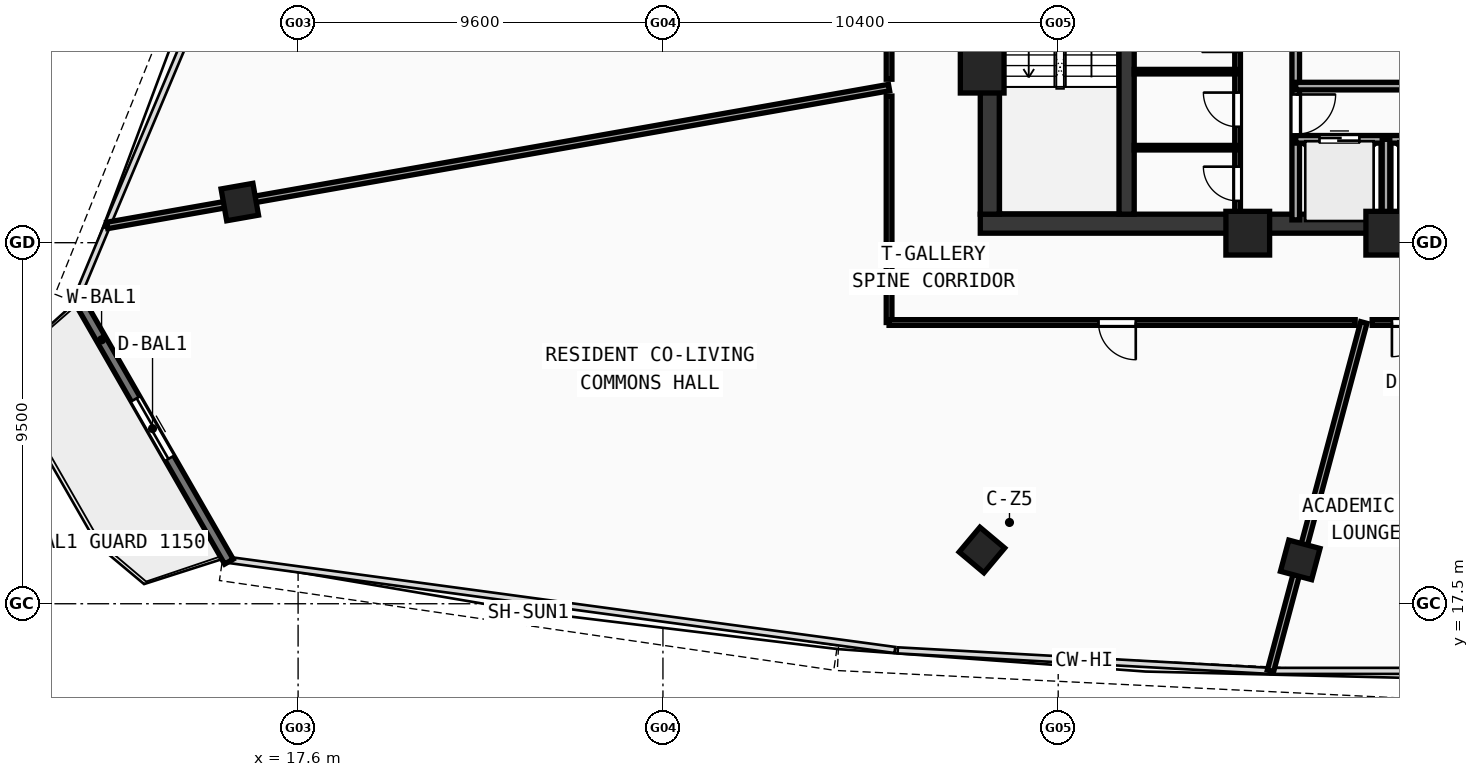
"""IFC4 building model, lengths in metres.
Left out: names, types, materials, properties, quantities, classifications, styles, units other than length and angle.
Written with IfcOpenShell. Run it as: python <this file> out.ifc"""

import sys

from ifc_helpers import new_model, si_unit, direction, frame, frame_2d, origin, origin_with_axes, origin_2d, place, context, subcontext, project, spatial, rectangle, hollow_rectangle, extrude, source, transform, mapped, element, fill, save


model = new_model("IFC4")
c1 = context("Model", 3, precision=1e-05, world=origin(), true_north=direction((0.0, 1.0)))
c2 = subcontext(c1, "Body", "Model", "MODEL_VIEW")
j1 = project(units=[si_unit("LENGTHUNIT", "METRE"), si_unit("PLANEANGLEUNIT", "RADIAN")], contexts=[c1])
p1 = place(None, origin())
s1 = spatial("IfcSite", under=j1, at=p1, CompositionType="ELEMENT")
p2 = place(p1, origin())
s2 = spatial("IfcBuilding", under=s1, at=p2, CompositionType="ELEMENT")
p3 = place(p2, frame((0.0, 0.0, 229.61)))
s3 = spatial("IfcBuildingStorey", under=s2, at=p3, CompositionType="ELEMENT", Elevation=229.61)
p4 = place(p3, frame((35.55, 27.5, 0.0), z_axis=(0.0, 0.0, 1.0), x_axis=(1.0, 0.0, 0.0)))
e1 = element("IfcWall", 1, at=p4, inside=s3, PredefinedType="SHEAR", context=c2, shape_type="SweptSolid", body=[
    extrude(rectangle(XDim=24.9, YDim=0.5, at=frame_2d((12.45, 0.0))), origin(), (0.0, 0.0, 1.0), 3.47),
])
p5 = place(p3, frame((35.8, 27.75, 0.0), z_axis=(0.0, 0.0, 1.0), x_axis=(0.0, 1.0, 0.0)))
e2 = element("IfcWall", 2, at=p5, inside=s3, PredefinedType="SHEAR", context=c2, shape_type="SweptSolid", body=[
    extrude(rectangle(XDim=12.2, YDim=0.5, at=frame_2d((6.1, 0.0))), origin(), (0.0, 0.0, 1.0), 3.47),
])
p6 = place(p3, frame((39.4, 27.75, 0.0), z_axis=(0.0, 0.0, 1.0), x_axis=(0.0, 1.0, 0.0)))
e3 = element("IfcWall", 3, at=p6, inside=s3, PredefinedType="SHEAR", context=c2, shape_type="SweptSolid", body=[
    extrude(rectangle(XDim=12.2, YDim=0.4, at=frame_2d((6.1, 0.0))), origin(), (0.0, 0.0, 1.0), 3.47),
])
p7 = place(p6, frame((10.0, 0.0, 0.0)))
e4 = element("IfcOpeningElement", 4, at=p7, cuts=e3, PredefinedType="OPENING", context=c2, shape_type="SweptSolid", body=[
    extrude(rectangle(XDim=1.1, YDim=2.1, at=frame_2d((0.55, 1.05))), frame((0.0, 0.21, 0.0), z_axis=(0.0, -1.0, 0.0), x_axis=(1.0, 0.0, 0.0)), (0.0, 0.0, 1.0), 0.42),
])
m1 = source(origin(), c2, "Body", "SweptSolid", [
    extrude(hollow_rectangle(XDim=1.15, YDim=1.15, WallThickness=0.048, at=origin_2d()), origin(), (0.0, 0.0, 1.0), 3.73),
])
for number, where, z_axis, x_axis in (
    (5, (42.588, 27.25, -0.26), (0.0, 0.0, 1.0), (1.0, 0.0, 0.0)),
    (6, (46.272, 27.25, -0.26), (0.0, 0.0, 1.0), (1.0, 0.0, 0.0)),
    (7, (35.6, 31.513, -0.26), (0.0, 0.0, 1.0), (1.0, 0.0, 0.0)),
):
    element("IfcColumn", number, at=place(p3, frame(where, z_axis=z_axis, x_axis=x_axis)), inside=s3, PredefinedType="COLUMN", context=c2, shape_type="MappedRepresentation", body=[
        mapped(m1, transform((0.0, 0.0, 0.0), scale=1.0)),
    ])
m2 = source(origin(), c2, "Body", "SweptSolid", [
    extrude(hollow_rectangle(XDim=0.85, YDim=0.85, WallThickness=0.034, at=origin_2d()), origin(), (0.0, 0.0, 1.0), 3.73),
])
for number, where, z_axis, x_axis in (
    (8, (35.593, 18.914, -0.26), (0.0, 0.0, 1.0), (0.766, -0.643, 0.0)),
    (9, (43.969, 18.654, -0.26), (0.0, 0.0, 1.0), (0.966, -0.259, 0.0)),
    (10, (16.066, 28.069, -0.26), (0.0, 0.0, 1.0), (0.174, -0.985, 0.0)),
):
    element("IfcColumn", number, at=place(p3, frame(where, z_axis=z_axis, x_axis=x_axis)), inside=s3, PredefinedType="COLUMN", context=c2, shape_type="MappedRepresentation", body=[
        mapped(m2, transform((0.0, 0.0, 0.0), scale=1.0)),
    ])
p8 = place(p3, frame((11.76, 25.609, 0.0), z_axis=(0.0, 0.0, 1.0), x_axis=(0.49791595327, -0.867225289921, 0.0)))
e11 = element("IfcWall", 11, at=p8, inside=s3, PredefinedType="STANDARD", context=c2, shape_type="SweptSolid", body=[
    extrude(rectangle(XDim=8.074, YDim=0.26, at=frame_2d((4.037, 0.0))), origin(), (0.0, 0.0, 1.0), 3.47),
])
p9 = place(p8, frame((3.137, 0.0, 0.0)))
e12 = element("IfcOpeningElement", 12, at=p9, cuts=e11, PredefinedType="OPENING", context=c2, shape_type="SweptSolid", body=[
    extrude(rectangle(XDim=1.8, YDim=2.15, at=frame_2d((0.9, 1.075))), frame((0.0, 0.14, 0.0), z_axis=(0.0, -1.0, 0.0), x_axis=(1.0, 0.0, 0.0)), (0.0, 0.0, 1.0), 0.28),
])
p10 = place(p3, frame((43.85, 27.6, 0.0), z_axis=(0.0, 0.0, 1.0), x_axis=(0.0, 1.0, 0.0)))
e13 = element("IfcWall", 13, at=p10, inside=s3, PredefinedType="SOLIDWALL", context=c2, shape_type="SweptSolid", body=[
    extrude(rectangle(XDim=6.22, YDim=0.2, at=frame_2d((3.11, 0.0))), origin(), (0.0, 0.0, 1.0), 3.47),
])
p11 = place(p10, frame((2.25, 0.0, 0.0)))
e14 = element("IfcOpeningElement", 14, at=p11, cuts=e13, PredefinedType="OPENING", context=c2, shape_type="SweptSolid", body=[
    extrude(rectangle(XDim=1.05, YDim=2.1, at=frame_2d((0.525, 1.05))), frame((0.0, 0.11, 0.0), z_axis=(0.0, -1.0, 0.0), x_axis=(1.0, 0.0, 0.0)), (0.0, 0.0, 1.0), 0.22),
])
p12 = place(p3, frame((43.85, 29.72, 0.0), z_axis=(0.0, 0.0, 1.0), x_axis=(1.0, 0.0, 0.0)))
e15 = element("IfcWall", 15, at=p12, inside=s3, PredefinedType="SOLIDWALL", context=c2, shape_type="SweptSolid", body=[
    extrude(rectangle(XDim=7.2, YDim=0.2, at=frame_2d((3.6, 0.0))), origin(), (0.0, 0.0, 1.0), 3.47),
])
p13 = place(p12, frame((0.625, 0.0, 0.0)))
e16 = element("IfcOpeningElement", 16, at=p13, cuts=e15, PredefinedType="OPENING", context=c2, shape_type="SweptSolid", body=[
    extrude(rectangle(XDim=1.05, YDim=2.1, at=frame_2d((0.525, 1.05))), frame((0.0, 0.11, 0.0), z_axis=(0.0, -1.0, 0.0), x_axis=(1.0, 0.0, 0.0)), (0.0, 0.0, 1.0), 0.22),
])
p14 = place(p12, frame((3.075, 0.0, 0.0)))
e17 = element("IfcOpeningElement", 17, at=p14, cuts=e15, PredefinedType="OPENING", context=c2, shape_type="SweptSolid", body=[
    extrude(rectangle(XDim=1.05, YDim=2.1, at=frame_2d((0.525, 1.05))), frame((0.0, 0.11, 0.0), z_axis=(0.0, -1.0, 0.0), x_axis=(1.0, 0.0, 0.0)), (0.0, 0.0, 1.0), 0.22),
])
p15 = place(p12, frame((5.525, 0.0, 0.0)))
e18 = element("IfcOpeningElement", 18, at=p15, cuts=e15, PredefinedType="OPENING", context=c2, shape_type="SweptSolid", body=[
    extrude(rectangle(XDim=1.05, YDim=2.1, at=frame_2d((0.525, 1.05))), frame((0.0, 0.11, 0.0), z_axis=(0.0, -1.0, 0.0), x_axis=(1.0, 0.0, 0.0)), (0.0, 0.0, 1.0), 0.22),
])
p16 = place(p3, frame((43.85, 31.12, 0.0), z_axis=(0.0, 0.0, 1.0), x_axis=(1.0, 0.0, 0.0)))
e19 = element("IfcWall", 19, at=p16, inside=s3, PredefinedType="SOLIDWALL", context=c2, shape_type="SweptSolid", body=[
    extrude(rectangle(XDim=9.83, YDim=0.2, at=frame_2d((4.915, 0.0))), origin(), (0.0, 0.0, 1.0), 3.47),
])
p17 = place(p3, frame((46.225, 27.6, 0.0), z_axis=(0.0, 0.0, 1.0), x_axis=(0.0, 1.0, 0.0)))
e20 = element("IfcWall", 20, at=p17, inside=s3, PredefinedType="SOLIDWALL", context=c2, shape_type="SweptSolid", body=[
    extrude(rectangle(XDim=2.12, YDim=0.2, at=frame_2d((1.06, 0.0))), origin(), (0.0, 0.0, 1.0), 3.47),
])
p18 = place(p3, frame((42.32, 27.6, 0.0), z_axis=(0.0, 0.0, 1.0), x_axis=(0.0, 1.0, 0.0)))
e21 = element("IfcWall", 21, at=p18, inside=s3, PredefinedType="PARTITIONING", context=c2, shape_type="SweptSolid", body=[
    extrude(rectangle(XDim=5.9, YDim=0.15, at=frame_2d((2.95, 0.0))), origin(), (0.0, 0.0, 1.0), 3.47),
])
p19 = place(p18, frame((0.5, 0.0, 0.0)))
e22 = element("IfcOpeningElement", 22, at=p19, cuts=e21, PredefinedType="OPENING", context=c2, shape_type="SweptSolid", body=[
    extrude(rectangle(XDim=0.9, YDim=2.1, at=frame_2d((0.45, 1.05))), frame((0.0, 0.085, 0.0), z_axis=(0.0, -1.0, 0.0), x_axis=(1.0, 0.0, 0.0)), (0.0, 0.0, 1.0), 0.17),
])
p20 = place(p18, frame((2.45, 0.0, 0.0)))
e23 = element("IfcOpeningElement", 23, at=p20, cuts=e21, PredefinedType="OPENING", context=c2, shape_type="SweptSolid", body=[
    extrude(rectangle(XDim=0.9, YDim=2.1, at=frame_2d((0.45, 1.05))), frame((0.0, 0.085, 0.0), z_axis=(0.0, -1.0, 0.0), x_axis=(1.0, 0.0, 0.0)), (0.0, 0.0, 1.0), 0.17),
])
p21 = place(p18, frame((4.42, 0.0, 0.0)))
e24 = element("IfcOpeningElement", 24, at=p21, cuts=e21, PredefinedType="OPENING", context=c2, shape_type="SweptSolid", body=[
    extrude(rectangle(XDim=0.94, YDim=2.1, at=frame_2d((0.47, 1.05))), frame((0.0, 0.085, 0.0), z_axis=(0.0, -1.0, 0.0), x_axis=(1.0, 0.0, 0.0)), (0.0, 0.0, 1.0), 0.17),
])
for number, where, z_axis, x_axis in (
    (25, (39.6, 29.5, 0.0), (0.0, 0.0, 1.0), (1.0, 0.0, 0.0)),
    (26, (39.6, 31.5, 0.0), (0.0, 0.0, 1.0), (1.0, 0.0, 0.0)),
):
    element("IfcWall", number, at=place(p3, frame(where, z_axis=z_axis, x_axis=x_axis)), inside=s3, PredefinedType="PARTITIONING", context=c2, shape_type="SweptSolid", body=[
        extrude(rectangle(XDim=2.72, YDim=0.12, at=frame_2d((1.36, 0.0))), origin(), (0.0, 0.0, 1.0), 3.47),
    ])
p22 = place(p3, frame((33.15, 31.082, 0.0), z_axis=(0.0, 0.0, 1.0), x_axis=(-0.984808138799, -0.17364598975, 0.0)))
e27 = element("IfcWall", 27, at=p22, inside=s3, PredefinedType="PARTITIONING", context=c2, shape_type="SweptSolid", body=[
    extrude(rectangle(XDim=20.89, YDim=0.17, at=frame_2d((10.445, 0.0))), origin(), (0.0, 0.0, 1.0), 2.82),
])
p23 = place(p3, frame((45.642, 24.9, 0.0), z_axis=(0.0, 0.0, 1.0), x_axis=(-0.258832957733, -0.965922098304, 0.0)))
e28 = element("IfcWall", 28, at=p23, inside=s3, PredefinedType="PARTITIONING", context=c2, shape_type="SweptSolid", body=[
    extrude(rectangle(XDim=9.49, YDim=0.17, at=frame_2d((4.745, 0.0))), origin(), (0.0, 0.0, 1.0), 2.82),
])
p24 = place(p3, frame((33.15, 24.9, 0.0), z_axis=(0.0, 0.0, 1.0), x_axis=(0.0, 1.0, 0.0)))
e29 = element("IfcWall", 29, at=p24, inside=s3, PredefinedType="PARTITIONING", context=c2, shape_type="SweptSolid", body=[
    extrude(rectangle(XDim=5.958, YDim=0.15, at=frame_2d((2.979, 0.0))), origin(), (0.0, 0.0, 1.0), 3.12),
])
p25 = place(p3, frame((33.15, 31.301, 0.0), z_axis=(0.0, 0.0, 1.0), x_axis=(0.0, 1.0, 0.0)))
e30 = element("IfcWall", 30, at=p25, inside=s3, PredefinedType="PARTITIONING", context=c2, shape_type="SweptSolid", body=[
    extrude(rectangle(XDim=7.004, YDim=0.15, at=frame_2d((3.502, 0.0))), origin(), (0.0, 0.0, 1.0), 3.47),
])
p26 = place(p25, frame((3.027, 0.0, 0.0)))
e31 = element("IfcOpeningElement", 31, at=p26, cuts=e30, PredefinedType="OPENING", context=c2, shape_type="SweptSolid", body=[
    extrude(rectangle(XDim=0.98, YDim=2.12, at=frame_2d((0.49, 1.06))), frame((0.0, 0.085, 0.0), z_axis=(0.0, -1.0, 0.0), x_axis=(1.0, 0.0, 0.0)), (0.0, 0.0, 1.0), 0.17),
])
p27 = place(p3, frame((47.78, 24.9, 0.0), z_axis=(0.0, 0.0, 1.0), x_axis=(-1.0, 0.0, 0.0)))
e32 = element("IfcWall", 32, at=p27, inside=s3, PredefinedType="PARTITIONING", context=c2, shape_type="SweptSolid", body=[
    extrude(rectangle(XDim=1.918, YDim=0.15, at=frame_2d((0.959, 0.0))), origin(), (0.0, 0.0, 1.0), 3.47),
])
p28 = place(p27, frame((0.499, 0.0, 0.0)))
e33 = element("IfcOpeningElement", 33, at=p28, cuts=e32, PredefinedType="OPENING", context=c2, shape_type="SweptSolid", body=[
    extrude(rectangle(XDim=0.9, YDim=2.08, at=frame_2d((0.45, 1.04))), frame((0.0, 0.085, 0.0), z_axis=(0.0, -1.0, 0.0), x_axis=(1.0, 0.0, 0.0)), (0.0, 0.0, 1.0), 0.17),
])
p29 = place(p3, frame((45.414, 24.9, 0.0), z_axis=(0.0, 0.0, 1.0), x_axis=(-1.0, 0.0, 0.0)))
e34 = element("IfcWall", 34, at=p29, inside=s3, PredefinedType="PARTITIONING", context=c2, shape_type="SweptSolid", body=[
    extrude(rectangle(XDim=12.264, YDim=0.15, at=frame_2d((6.132, 0.0))), origin(), (0.0, 0.0, 1.0), 2.82),
])
p30 = place(p29, frame((5.773, 0.0, 0.0)))
e35 = element("IfcOpeningElement", 35, at=p30, cuts=e34, PredefinedType="OPENING", context=c2, shape_type="SweptSolid", body=[
    extrude(rectangle(XDim=0.98, YDim=2.12, at=frame_2d((0.49, 1.06))), frame((0.0, 0.085, 0.0), z_axis=(0.0, -1.0, 0.0), x_axis=(1.0, 0.0, 0.0)), (0.0, 0.0, 1.0), 0.17),
])
m3 = source(origin(), c2, "Body", "SweptSolid", [
    extrude(rectangle(XDim=1.8, YDim=2.15, at=frame_2d((0.9, 1.075))), frame((0.0, 0.025, 0.0), z_axis=(0.0, -1.0, 0.0), x_axis=(1.0, 0.0, 0.0)), (0.0, 0.0, 1.0), 0.05),
])
p31 = place(p9, origin_with_axes())
e36 = element("IfcDoor", 36, at=p31, inside=s3, OperationType="DOUBLE_DOOR_SLIDING", PredefinedType="DOOR", context=c2, shape_type="MappedRepresentation", body=[
    mapped(m3, transform((0.0, 0.0, 0.0), scale=1.0)),
])
fill(e12, e36)
m4 = source(origin(), c2, "Body", "SweptSolid", [
    extrude(rectangle(XDim=1.05, YDim=2.1, at=frame_2d((0.525, 1.05))), frame((0.0, 0.025, 0.0), z_axis=(0.0, -1.0, 0.0), x_axis=(1.0, 0.0, 0.0)), (0.0, 0.0, 1.0), 0.05),
])
p32 = place(p11, frame((1.05, 0.0, 0.0), z_axis=(0.0, 0.0, 1.0), x_axis=(-1.0, 0.0, 0.0)))
e37 = element("IfcDoor", 37, at=p32, inside=s3, OperationType="SINGLE_SWING_LEFT", PredefinedType="DOOR", context=c2, shape_type="MappedRepresentation", body=[
    mapped(m4, transform((0.0, 0.0, 0.0), scale=1.0)),
])
fill(e14, e37)
p33 = place(p13, origin_with_axes())
e38 = element("IfcDoor", 38, at=p33, inside=s3, OperationType="DOUBLE_DOOR_SLIDING", PredefinedType="DOOR", context=c2, shape_type="MappedRepresentation", body=[
    mapped(m4, transform((0.0, 0.0, 0.0), scale=1.0)),
])
fill(e16, e38)
m5 = source(origin(), c2, "Body", "SweptSolid", [
    extrude(rectangle(XDim=0.9, YDim=2.1, at=frame_2d((0.45, 1.05))), frame((0.0, 0.025, 0.0), z_axis=(0.0, -1.0, 0.0), x_axis=(1.0, 0.0, 0.0)), (0.0, 0.0, 1.0), 0.05),
])
p34 = place(p19, origin_with_axes())
e39 = element("IfcDoor", 39, at=p34, inside=s3, OperationType="SINGLE_SWING_RIGHT", PredefinedType="DOOR", context=c2, shape_type="MappedRepresentation", body=[
    mapped(m5, transform((0.0, 0.0, 0.0), scale=1.0)),
])
fill(e22, e39)
p35 = place(p20, origin_with_axes())
e40 = element("IfcDoor", 40, at=p35, inside=s3, OperationType="SINGLE_SWING_RIGHT", PredefinedType="DOOR", context=c2, shape_type="MappedRepresentation", body=[
    mapped(m5, transform((0.0, 0.0, 0.0), scale=1.0)),
])
fill(e23, e40)
m6 = source(origin(), c2, "Body", "SweptSolid", [
    extrude(rectangle(XDim=0.98, YDim=2.12, at=frame_2d((0.49, 1.06))), frame((0.0, 0.025, 0.0), z_axis=(0.0, -1.0, 0.0), x_axis=(1.0, 0.0, 0.0)), (0.0, 0.0, 1.0), 0.05),
])
p36 = place(p30, origin_with_axes())
e41 = element("IfcDoor", 41, at=p36, inside=s3, OperationType="SINGLE_SWING_LEFT", PredefinedType="DOOR", context=c2, shape_type="MappedRepresentation", body=[
    mapped(m6, transform((0.0, 0.0, 0.0), scale=1.0)),
])
fill(e35, e41)
m7 = source(origin(), c2, "Body", "SweptSolid", [
    extrude(rectangle(XDim=0.9, YDim=2.08, at=frame_2d((0.45, 1.04))), frame((0.0, 0.025, 0.0), z_axis=(0.0, -1.0, 0.0), x_axis=(1.0, 0.0, 0.0)), (0.0, 0.0, 1.0), 0.05),
])
p37 = place(p28, origin_with_axes())
e42 = element("IfcDoor", 42, at=p37, inside=s3, OperationType="SINGLE_SWING_RIGHT", PredefinedType="DOOR", context=c2, shape_type="MappedRepresentation", body=[
    mapped(m7, transform((0.0, 0.0, 0.0), scale=1.0)),
])
fill(e33, e42)
save(model, sys.argv[1])
